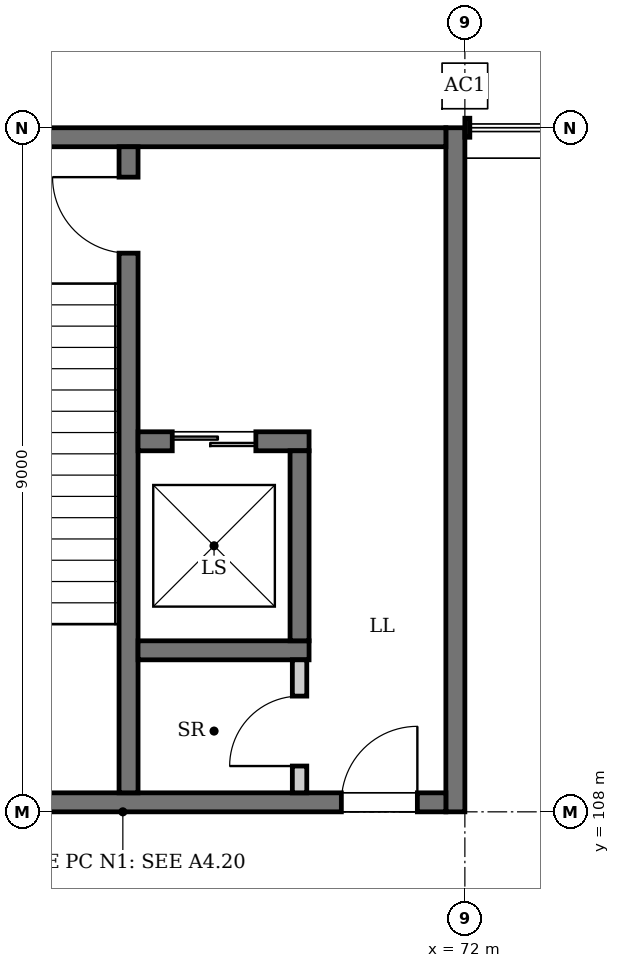
"""IFC4 building model, lengths in metres.
Left out: names, types, materials, properties, quantities, classifications, styles, units other than length and angle.
Written with IfcOpenShell. Run it as: python <this file> out.ifc"""

import sys

from ifc_helpers import new_model, si_unit, direction, frame, frame_2d, origin, origin_2d, place, context, subcontext, project, spatial, rectangle, hollow_rectangle, extrude, element, fill, save


model = new_model("IFC4")
c1 = context("Model", 3, precision=1e-05, world=origin(), true_north=direction((0.0, 1.0)))
c2 = subcontext(c1, "Body", "Model", "MODEL_VIEW")
j1 = project(units=[si_unit("LENGTHUNIT", "METRE"), si_unit("PLANEANGLEUNIT", "RADIAN")], contexts=[c1])
p1 = place(None, origin())
s1 = spatial("IfcSite", under=j1, at=p1, CompositionType="ELEMENT")
p2 = place(p1, origin())
s2 = spatial("IfcBuilding", under=s1, at=p2, CompositionType="ELEMENT")
p3 = place(p2, origin())
s3 = spatial("IfcBuildingStorey", under=s2, at=p3, CompositionType="ELEMENT", Elevation=0.0)
p4 = place(p3, frame((71.875, 108.0, 0.0), z_axis=(0.0, 0.0, 1.0), x_axis=(0.0, 1.0, 0.0)))
e1 = element("IfcWall", 1, at=p4, inside=s3, PredefinedType="SHEAR", context=c2, shape_type="SweptSolid", body=[
    extrude(rectangle(XDim=9.0, YDim=0.25, at=frame_2d((4.5, 0.0))), origin(), (0.0, 0.0, 1.0), 6.0),
])
p5 = place(p3, frame((63.25, 108.125, 0.0), z_axis=(0.0, 0.0, 1.0), x_axis=(1.0, 0.0, 0.0)))
e2 = element("IfcWall", 2, at=p5, inside=s3, PredefinedType="SHEAR", context=c2, shape_type="SweptSolid", body=[
    extrude(rectangle(XDim=8.5, YDim=0.25, at=frame_2d((4.25, 0.0))), origin(), (0.0, 0.0, 1.0), 6.0),
])
p6 = place(p5, frame((7.125, 0.0, 0.0)))
e3 = element("IfcOpeningElement", 3, at=p6, cuts=e2, PredefinedType="OPENING", context=c2, shape_type="SweptSolid", body=[
    extrude(rectangle(XDim=1.0, YDim=2.1, at=frame_2d((0.5, 1.05))), frame((0.0, 0.135, 0.0), z_axis=(0.0, -1.0, 0.0), x_axis=(1.0, 0.0, 0.0)), (0.0, 0.0, 1.0), 0.27),
])
p7 = place(p3, frame((63.25, 116.875, 0.0), z_axis=(0.0, 0.0, 1.0), x_axis=(1.0, 0.0, 0.0)))
e4 = element("IfcWall", 4, at=p7, inside=s3, PredefinedType="SHEAR", context=c2, shape_type="SweptSolid", body=[
    extrude(rectangle(XDim=8.5, YDim=0.25, at=frame_2d((4.25, 0.0))), origin(), (0.0, 0.0, 1.0), 6.0),
])
p8 = place(p7, frame((0.1, 0.0, 0.0)))
e5 = element("IfcOpeningElement", 5, at=p8, cuts=e4, PredefinedType="OPENING", context=c2, shape_type="SweptSolid", body=[
    extrude(rectangle(XDim=1.8, YDim=2.4, at=frame_2d((0.9, 1.2))), frame((0.0, 0.135, 0.0), z_axis=(0.0, -1.0, 0.0), x_axis=(1.0, 0.0, 0.0)), (0.0, 0.0, 1.0), 0.27),
])
p9 = place(p3, frame((67.575, 116.75, 0.0), z_axis=(0.0, 0.0, 1.0), x_axis=(0.0, -1.0, 0.0)))
e6 = element("IfcWall", 6, at=p9, inside=s3, PredefinedType="SOLIDWALL", context=c2, shape_type="SweptSolid", body=[
    extrude(rectangle(XDim=8.5, YDim=0.25, at=frame_2d((4.25, 0.0))), origin(), (0.0, 0.0, 1.0), 5.75),
])
p10 = place(p9, frame((0.4, 0.0, 0.0)))
e7 = element("IfcOpeningElement", 7, at=p10, cuts=e6, PredefinedType="OPENING", context=c2, shape_type="SweptSolid", body=[
    extrude(rectangle(XDim=1.0, YDim=2.1, at=frame_2d((0.5, 1.05))), frame((0.0, 0.135, 0.0), z_axis=(0.0, -1.0, 0.0), x_axis=(1.0, 0.0, 0.0)), (0.0, 0.0, 1.0), 0.27),
])
p11 = place(p3, frame((67.7, 110.125, 0.0), z_axis=(0.0, 0.0, 1.0), x_axis=(1.0, 0.0, 0.0)))
e8 = element("IfcWall", 8, at=p11, inside=s3, PredefinedType="SOLIDWALL", context=c2, shape_type="SweptSolid", body=[
    extrude(rectangle(XDim=2.25, YDim=0.25, at=frame_2d((1.125, 0.0))), origin(), (0.0, 0.0, 1.0), 6.0),
])
p12 = place(p3, frame((67.7, 112.875, 0.0), z_axis=(0.0, 0.0, 1.0), x_axis=(1.0, 0.0, 0.0)))
e9 = element("IfcWall", 9, at=p12, inside=s3, PredefinedType="SOLIDWALL", context=c2, shape_type="SweptSolid", body=[
    extrude(rectangle(XDim=2.25, YDim=0.25, at=frame_2d((1.125, 0.0))), origin(), (0.0, 0.0, 1.0), 6.0),
])
p13 = place(p12, frame((0.45, 0.0, 0.0)))
e10 = element("IfcOpeningElement", 10, at=p13, cuts=e9, PredefinedType="OPENING", context=c2, shape_type="SweptSolid", body=[
    extrude(rectangle(XDim=1.1, YDim=2.1, at=frame_2d((0.55, 1.05))), frame((0.0, 0.135, 0.0), z_axis=(0.0, -1.0, 0.0), x_axis=(1.0, 0.0, 0.0)), (0.0, 0.0, 1.0), 0.27),
])
p14 = place(p3, frame((69.825, 110.25, 0.0), z_axis=(0.0, 0.0, 1.0), x_axis=(0.0, 1.0, 0.0)))
e11 = element("IfcWall", 11, at=p14, inside=s3, PredefinedType="SOLIDWALL", context=c2, shape_type="SweptSolid", body=[
    extrude(rectangle(XDim=2.5, YDim=0.25, at=frame_2d((1.25, 0.0))), origin(), (0.0, 0.0, 1.0), 6.0),
])
p15 = place(p3, frame((69.825, 108.25, 0.0), z_axis=(0.0, 0.0, 1.0), x_axis=(0.0, 1.0, 0.0)))
e12 = element("IfcWall", 12, at=p15, inside=s3, PredefinedType="PARTITIONING", context=c2, shape_type="SweptSolid", body=[
    extrude(rectangle(XDim=1.75, YDim=0.19, at=frame_2d((0.875, 0.0))), origin(), (0.0, 0.0, 1.0), 5.75),
])
p16 = place(p15, frame((0.353, 0.0, 0.0)))
e13 = element("IfcOpeningElement", 13, at=p16, cuts=e12, PredefinedType="OPENING", context=c2, shape_type="SweptSolid", body=[
    extrude(rectangle(XDim=0.92, YDim=2.1, at=frame_2d((0.46, 1.05))), frame((0.0, 0.105, 0.0), z_axis=(0.0, -1.0, 0.0), x_axis=(1.0, 0.0, 0.0)), (0.0, 0.0, 1.0), 0.21),
])
p17 = place(p3, frame((72.0, 117.55, 0.0), z_axis=(0.0, 0.0, 1.0), x_axis=(1.0, 0.0, 0.0)))
e14 = element("IfcColumn", 14, at=p17, inside=s3, PredefinedType="COLUMN", context=c2, shape_type="SweptSolid", body=[
    extrude(hollow_rectangle(XDim=0.15, YDim=0.15, WallThickness=0.009, at=origin_2d()), origin(), (0.0, 0.0, 1.0), 3.715),
])
p18 = place(p13, origin())
e15 = element("IfcDoor", 15, at=p18, inside=s3, OperationType="DOUBLE_DOOR_SLIDING", PredefinedType="DOOR", context=c2, shape_type="SweptSolid", body=[
    extrude(rectangle(XDim=1.1, YDim=2.1, at=frame_2d((0.55, 1.05))), frame((0.0, 0.025, 0.0), z_axis=(0.0, -1.0, 0.0), x_axis=(1.0, 0.0, 0.0)), (0.0, 0.0, 1.0), 0.05),
])
fill(e10, e15)
p19 = place(p10, frame((1.0, 0.0, 0.0), z_axis=(0.0, 0.0, 1.0), x_axis=(-1.0, 0.0, 0.0)))
e16 = element("IfcDoor", 16, at=p19, inside=s3, OperationType="SINGLE_SWING_RIGHT", PredefinedType="DOOR", context=c2, shape_type="SweptSolid", body=[
    extrude(rectangle(XDim=1.0, YDim=2.1, at=frame_2d((0.5, 1.05))), frame((0.0, 0.025, 0.0), z_axis=(0.0, -1.0, 0.0), x_axis=(1.0, 0.0, 0.0)), (0.0, 0.0, 1.0), 0.05),
])
fill(e7, e16)
p20 = place(p16, origin())
e17 = element("IfcDoor", 17, at=p20, inside=s3, OperationType="SINGLE_SWING_LEFT", PredefinedType="DOOR", context=c2, shape_type="SweptSolid", body=[
    extrude(rectangle(XDim=0.92, YDim=2.1, at=frame_2d((0.46, 1.05))), frame((0.0, 0.025, 0.0), z_axis=(0.0, -1.0, 0.0), x_axis=(1.0, 0.0, 0.0)), (0.0, 0.0, 1.0), 0.05),
])
fill(e13, e17)
p21 = place(p6, origin())
e18 = element("IfcDoor", 18, at=p21, inside=s3, OperationType="SINGLE_SWING_RIGHT", PredefinedType="DOOR", context=c2, shape_type="SweptSolid", body=[
    extrude(rectangle(XDim=1.0, YDim=2.1, at=frame_2d((0.5, 1.05))), frame((0.0, 0.025, 0.0), z_axis=(0.0, -1.0, 0.0), x_axis=(1.0, 0.0, 0.0)), (0.0, 0.0, 1.0), 0.05),
])
fill(e3, e18)
save(model, sys.argv[1])
